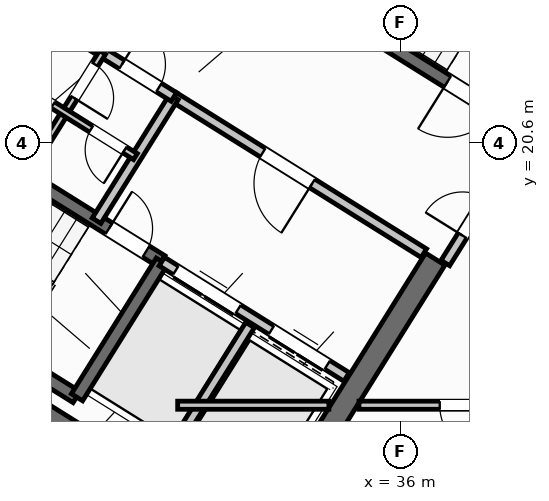
"""IFC4 building model, lengths in metres.
Left out: names, types, materials, properties, quantities, classifications, styles, units other than length and angle.
Written with IfcOpenShell. Run it as: python <this file> out.ifc"""

import sys

from ifc_helpers import new_model, si_unit, direction, frame, frame_2d, origin, place, context, subcontext, project, spatial, rectangle, extrude, source, transform, mapped, element, fill, save


model = new_model("IFC4")
c1 = context("Model", 3, precision=1e-05, world=origin(), true_north=direction((0.0, 1.0)))
c2 = subcontext(c1, "Body", "Model", "MODEL_VIEW")
j1 = project(units=[si_unit("LENGTHUNIT", "METRE"), si_unit("PLANEANGLEUNIT", "RADIAN")], contexts=[c1])
p1 = place(None, origin())
s1 = spatial("IfcSite", under=j1, at=p1, CompositionType="ELEMENT")
p2 = place(p1, origin())
s2 = spatial("IfcBuilding", under=s1, at=p2, CompositionType="ELEMENT")
p3 = place(p2, frame((0.0, 0.0, 295.2)))
s3 = spatial("IfcBuildingStorey", under=s2, at=p3, CompositionType="ELEMENT", Elevation=295.2)
p4 = place(p3, frame((33.324, 12.503, 0.0), z_axis=(0.0, 0.0, 1.0), x_axis=(-0.848043529849, 0.529926571782, 0.0)))
e1 = element("IfcWall", 1, at=p4, inside=s3, PredefinedType="SHEAR", context=c2, shape_type="SweptSolid", body=[
    extrude(rectangle(XDim=13.04, YDim=0.45, at=frame_2d((6.52, 0.0))), origin(), (0.0, 0.0, 1.0), 3.32),
])
p5 = place(p3, frame((36.683, 18.304, 0.0), z_axis=(0.0, 0.0, 1.0), x_axis=(-0.529904039071, -0.848057609704, 0.0)))
e2 = element("IfcWall", 2, at=p5, inside=s3, PredefinedType="SHEAR", context=c2, shape_type="SweptSolid", body=[
    extrude(rectangle(XDim=6.475, YDim=0.45, at=frame_2d((3.238, 0.0))), origin(), (0.0, 0.0, 1.0), 3.32),
])
p6 = place(p3, frame((29.268, 6.429, 0.0), z_axis=(0.0, 0.0, 1.0), x_axis=(-0.848048398186, 0.529918780885, 0.0)))
e3 = element("IfcWall", 3, at=p6, inside=s3, PredefinedType="STANDARD", context=c2, shape_type="SweptSolid", body=[
    extrude(rectangle(XDim=25.188, YDim=0.32, at=frame_2d((12.594, 0.0))), origin(), (0.0, 0.0, 1.0), 3.32),
])
p7 = place(p6, frame((16.362, 0.0, 0.0)))
e4 = element("IfcOpeningElement", 4, at=p7, cuts=e3, PredefinedType="OPENING", context=c2, shape_type="SweptSolid", body=[
    extrude(rectangle(XDim=1.2, YDim=2.15, at=frame_2d((0.6, 1.075))), frame((0.0, 0.17, 0.0), z_axis=(0.0, -1.0, 0.0), x_axis=(1.0, 0.0, 0.0)), (0.0, 0.0, 1.0), 0.34),
])
p8 = place(p6, frame((3.859, 0.0, 0.9)))
e5 = element("IfcOpeningElement", 5, at=p8, cuts=e3, PredefinedType="OPENING", context=c2, shape_type="SweptSolid", body=[
    extrude(rectangle(XDim=1.65, YDim=1.45, at=frame_2d((0.825, 0.725))), frame((0.0, 0.17, 0.0), z_axis=(0.0, -1.0, 0.0), x_axis=(1.0, 0.0, 0.0)), (0.0, 0.0, 1.0), 0.34),
])
p9 = place(p6, frame((10.519, 0.0, 0.9)))
e6 = element("IfcOpeningElement", 6, at=p9, cuts=e3, PredefinedType="OPENING", context=c2, shape_type="SweptSolid", body=[
    extrude(rectangle(XDim=1.65, YDim=1.45, at=frame_2d((0.825, 0.725))), frame((0.0, 0.17, 0.0), z_axis=(0.0, -1.0, 0.0), x_axis=(1.0, 0.0, 0.0)), (0.0, 0.0, 1.0), 0.34),
])
p10 = place(p6, frame((21.156, 0.0, 0.95)))
e7 = element("IfcOpeningElement", 7, at=p10, cuts=e3, PredefinedType="OPENING", context=c2, shape_type="SweptSolid", body=[
    extrude(rectangle(XDim=1.95, YDim=1.35, at=frame_2d((0.975, 0.675))), frame((0.0, 0.17, 0.0), z_axis=(0.0, -1.0, 0.0), x_axis=(1.0, 0.0, 0.0)), (0.0, 0.0, 1.0), 0.34),
])
p11 = place(p3, frame((29.605, 15.581, 0.0), z_axis=(0.0, 0.0, 1.0), x_axis=(-0.848036911448, 0.529937163087, 0.0)))
e8 = element("IfcWall", 8, at=p11, inside=s3, PredefinedType="SHEAR", context=c2, shape_type="SweptSolid", body=[
    extrude(rectangle(XDim=7.46, YDim=0.26, at=frame_2d((3.73, 0.0))), origin(), (0.0, 0.0, 1.0), 3.32),
])
p12 = place(p3, frame((31.28, 18.261, 0.0), z_axis=(0.0, 0.0, 1.0), x_axis=(-0.848051618787, 0.529913626805, 0.0)))
e9 = element("IfcWall", 9, at=p12, inside=s3, PredefinedType="SHEAR", context=c2, shape_type="SweptSolid", body=[
    extrude(rectangle(XDim=7.46, YDim=0.26, at=frame_2d((3.73, 0.0))), origin(), (0.0, 0.0, 1.0), 3.32),
])
p13 = place(p12, frame((0.36, 0.0, 0.0)))
e10 = element("IfcOpeningElement", 10, at=p13, cuts=e9, PredefinedType="OPENING", context=c2, shape_type="SweptSolid", body=[
    extrude(rectangle(XDim=0.86, YDim=2.05, at=frame_2d((0.43, 1.025))), frame((0.0, 0.14, 0.0), z_axis=(0.0, -1.0, 0.0), x_axis=(1.0, 0.0, 0.0)), (0.0, 0.0, 1.0), 0.28),
])
p14 = place(p3, frame((31.288, 18.256, 0.0), z_axis=(0.0, 0.0, 1.0), x_axis=(-0.529943379326, -0.848033026897, 0.0)))
e11 = element("IfcWall", 11, at=p14, inside=s3, PredefinedType="SHEAR", context=c2, shape_type="SweptSolid", body=[
    extrude(rectangle(XDim=3.16, YDim=0.26, at=frame_2d((1.58, 0.0))), origin(), (0.0, 0.0, 1.0), 3.32),
])
p15 = place(p3, frame((38.046, 21.108, 0.0), z_axis=(0.0, 0.0, 1.0), x_axis=(-0.848054434086, 0.529909121291, 0.0)))
e12 = element("IfcWall", 12, at=p15, inside=s3, PredefinedType="SHEAR", context=c2, shape_type="SweptSolid", body=[
    extrude(rectangle(XDim=7.33, YDim=0.26, at=frame_2d((3.665, 0.0))), origin(), (0.0, 0.0, 1.0), 3.32),
])
p16 = place(p15, frame((0.22, 0.0, 0.0)))
e13 = element("IfcOpeningElement", 13, at=p16, cuts=e12, PredefinedType="OPENING", context=c2, shape_type="SweptSolid", body=[
    extrude(rectangle(XDim=1.1, YDim=2.1, at=frame_2d((0.55, 1.05))), frame((0.0, 0.14, 0.0), z_axis=(0.0, -1.0, 0.0), x_axis=(1.0, 0.0, 0.0)), (0.0, 0.0, 1.0), 0.28),
])
p17 = place(p3, frame((34.933, 15.978, 0.0), z_axis=(0.0, 0.0, 1.0), x_axis=(-0.848055739377, 0.529907032327, 0.0)))
e14 = element("IfcWall", 14, at=p17, inside=s3, PredefinedType="STANDARD", context=c2, shape_type="SweptSolid", body=[
    extrude(rectangle(XDim=4.298, YDim=0.2, at=frame_2d((2.149, 0.0))), origin(), (0.0, 0.0, 1.0), 3.31),
])
p18 = place(p17, frame((0.448, 0.0, 0.0)))
e15 = element("IfcOpeningElement", 15, at=p18, cuts=e14, PredefinedType="OPENING", context=c2, shape_type="SweptSolid", body=[
    extrude(rectangle(XDim=1.3, YDim=2.2, at=frame_2d((0.65, 1.1))), frame((0.0, 0.11, 0.0), z_axis=(0.0, -1.0, 0.0), x_axis=(1.0, 0.0, 0.0)), (0.0, 0.0, 1.0), 0.22),
])
p19 = place(p17, frame((2.523, 0.0, 0.0)))
e16 = element("IfcOpeningElement", 16, at=p19, cuts=e14, PredefinedType="OPENING", context=c2, shape_type="SweptSolid", body=[
    extrude(rectangle(XDim=1.45, YDim=2.25, at=frame_2d((0.725, 1.125))), frame((0.0, 0.11, 0.0), z_axis=(0.0, -1.0, 0.0), x_axis=(1.0, 0.0, 0.0)), (0.0, 0.0, 1.0), 0.22),
])
p20 = place(p3, frame((36.459, 18.421, 0.0), z_axis=(0.0, 0.0, 1.0), x_axis=(-0.848059591691, 0.529900867089, 0.0)))
e17 = element("IfcWall", 17, at=p20, inside=s3, PredefinedType="STANDARD", context=c2, shape_type="SweptSolid", body=[
    extrude(rectangle(XDim=5.818, YDim=0.2, at=frame_2d((2.909, 0.0))), origin(), (0.0, 0.0, 1.0), 3.31),
])
p21 = place(p20, frame((2.598, 0.0, 0.0)))
e18 = element("IfcOpeningElement", 18, at=p21, cuts=e17, PredefinedType="OPENING", context=c2, shape_type="SweptSolid", body=[
    extrude(rectangle(XDim=1.15, YDim=2.1, at=frame_2d((0.575, 1.05))), frame((0.0, 0.11, 0.0), z_axis=(0.0, -1.0, 0.0), x_axis=(1.0, 0.0, 0.0)), (0.0, 0.0, 1.0), 0.22),
])
p22 = place(p3, frame((33.029, 17.003, 0.0), z_axis=(0.0, 0.0, 1.0), x_axis=(-0.529916267533, -0.848049968695, 0.0)))
e19 = element("IfcWall", 19, at=p22, inside=s3, PredefinedType="STANDARD", context=c2, shape_type="SweptSolid", body=[
    extrude(rectangle(XDim=2.92, YDim=0.2, at=frame_2d((1.46, 0.0))), origin(), (0.0, 0.0, 1.0), 3.31),
])
p23 = place(p3, frame((31.525, 21.504, 0.0), z_axis=(0.0, 0.0, 1.0), x_axis=(-0.529907497854, -0.848055448493, 0.0)))
e20 = element("IfcWall", 20, at=p23, inside=s3, PredefinedType="STANDARD", context=c2, shape_type="SweptSolid", body=[
    extrude(rectangle(XDim=2.88, YDim=0.2, at=frame_2d((1.44, 0.0))), origin(), (0.0, 0.0, 1.0), 3.31),
])
p24 = place(p3, frame((31.525, 21.504, 0.0), z_axis=(0.0, 0.0, 1.0), x_axis=(-0.848042066329, 0.529928913853, 0.0)))
e21 = element("IfcWall", 21, at=p24, inside=s3, PredefinedType="STANDARD", context=c2, shape_type="SweptSolid", body=[
    extrude(rectangle(XDim=6.268, YDim=0.2, at=frame_2d((3.134, 0.0))), origin(), (0.0, 0.0, 1.0), 3.31),
])
p25 = place(p24, frame((4.4, 0.0, 0.0)))
e22 = element("IfcOpeningElement", 22, at=p25, cuts=e21, PredefinedType="OPENING", context=c2, shape_type="SweptSolid", body=[
    extrude(rectangle(XDim=0.86, YDim=2.05, at=frame_2d((0.43, 1.025))), frame((0.0, 0.11, 0.0), z_axis=(0.0, -1.0, 0.0), x_axis=(1.0, 0.0, 0.0)), (0.0, 0.0, 1.0), 0.22),
])
p26 = place(p24, frame((0.35, 0.0, 0.0)))
e23 = element("IfcOpeningElement", 23, at=p26, cuts=e21, PredefinedType="OPENING", context=c2, shape_type="SweptSolid", body=[
    extrude(rectangle(XDim=0.86, YDim=2.05, at=frame_2d((0.43, 1.025))), frame((0.0, 0.11, 0.0), z_axis=(0.0, -1.0, 0.0), x_axis=(1.0, 0.0, 0.0)), (0.0, 0.0, 1.0), 0.22),
])
p27 = place(p3, frame((30.117, 22.384, 0.0), z_axis=(0.0, 0.0, 1.0), x_axis=(-0.529951914384, -0.848027693204, 0.0)))
e24 = element("IfcWall", 24, at=p27, inside=s3, PredefinedType="PLUMBINGWALL", context=c2, shape_type="SweptSolid", body=[
    extrude(rectangle(XDim=1.4, YDim=0.14, at=frame_2d((0.7, 0.0))), origin(), (0.0, 0.0, 1.0), 3.31),
])
p28 = place(p27, frame((0.28, 0.0, 0.0)))
e25 = element("IfcOpeningElement", 25, at=p28, cuts=e24, PredefinedType="OPENING", context=c2, shape_type="SweptSolid", body=[
    extrude(rectangle(XDim=0.78, YDim=2.05, at=frame_2d((0.39, 1.025))), frame((0.0, 0.08, 0.0), z_axis=(0.0, -1.0, 0.0), x_axis=(1.0, 0.0, 0.0)), (0.0, 0.0, 1.0), 0.16),
])
p29 = place(p3, frame((29.375, 21.196, 0.0), z_axis=(0.0, 0.0, 1.0), x_axis=(-0.529865479138, -0.848081702443, 0.0)))
e26 = element("IfcWall", 26, at=p29, inside=s3, PredefinedType="PLUMBINGWALL", context=c2, shape_type="SweptSolid", body=[
    extrude(rectangle(XDim=1.48, YDim=0.14, at=frame_2d((0.74, 0.0))), origin(), (0.0, 0.0, 1.0), 3.31),
])
p30 = place(p3, frame((30.766, 20.327, 0.0), z_axis=(0.0, 0.0, 1.0), x_axis=(-0.848052663127, 0.529911955482, 0.0)))
e27 = element("IfcWall", 27, at=p30, inside=s3, PredefinedType="PLUMBINGWALL", context=c2, shape_type="SweptSolid", body=[
    extrude(rectangle(XDim=3.28, YDim=0.14, at=frame_2d((1.64, 0.0))), origin(), (0.0, 0.0, 1.0), 3.31),
])
p31 = place(p30, frame((0.25, 0.0, 0.0)))
e28 = element("IfcOpeningElement", 28, at=p31, cuts=e27, PredefinedType="OPENING", context=c2, shape_type="SweptSolid", body=[
    extrude(rectangle(XDim=0.78, YDim=2.05, at=frame_2d((0.39, 1.025))), frame((0.0, 0.08, 0.0), z_axis=(0.0, -1.0, 0.0), x_axis=(1.0, 0.0, 0.0)), (0.0, 0.0, 1.0), 0.16),
])
p32 = place(p30, frame((1.92, 0.0, 0.0)))
e29 = element("IfcOpeningElement", 29, at=p32, cuts=e27, PredefinedType="OPENING", context=c2, shape_type="SweptSolid", body=[
    extrude(rectangle(XDim=0.78, YDim=2.05, at=frame_2d((0.39, 1.025))), frame((0.0, 0.08, 0.0), z_axis=(0.0, -1.0, 0.0), x_axis=(1.0, 0.0, 0.0)), (0.0, 0.0, 1.0), 0.16),
])
p33 = place(p3, frame((32.164, 10.374, 0.0), z_axis=(0.0, 0.0, 1.0), x_axis=(-0.848044107957, 0.529925646633, 0.0)))
e30 = element("IfcWall", 30, at=p33, inside=s3, PredefinedType="PARTITIONING", context=c2, shape_type="SweptSolid", body=[
    extrude(rectangle(XDim=15.57, YDim=0.16, at=frame_2d((7.785, 0.0))), origin(), (0.0, 0.0, 1.0), 3.31),
])
p34 = place(p33, frame((10.83, 0.0, 0.0)))
e31 = element("IfcOpeningElement", 31, at=p34, cuts=e30, PredefinedType="OPENING", context=c2, shape_type="SweptSolid", body=[
    extrude(rectangle(XDim=1.0, YDim=2.1, at=frame_2d((0.5, 1.05))), frame((0.0, 0.09, 0.0), z_axis=(0.0, -1.0, 0.0), x_axis=(1.0, 0.0, 0.0)), (0.0, 0.0, 1.0), 0.18),
])
p35 = place(p3, frame((29.72, 8.859, 0.0), z_axis=(0.0, 0.0, 1.0), x_axis=(-0.848049134363, 0.529917602752, 0.0)))
e32 = element("IfcWall", 32, at=p35, inside=s3, PredefinedType="PLUMBINGWALL", context=c2, shape_type="SweptSolid", body=[
    extrude(rectangle(XDim=14.3, YDim=0.14, at=frame_2d((7.15, 0.0))), origin(), (0.0, 0.0, 1.0), 3.31),
])
p36 = place(p35, frame((9.57, 0.0, 0.0)))
e33 = element("IfcOpeningElement", 33, at=p36, cuts=e32, PredefinedType="OPENING", context=c2, shape_type="SweptSolid", body=[
    extrude(rectangle(XDim=0.92, YDim=2.08, at=frame_2d((0.46, 1.04))), frame((0.0, 0.08, 0.0), z_axis=(0.0, -1.0, 0.0), x_axis=(1.0, 0.0, 0.0)), (0.0, 0.0, 1.0), 0.16),
])
p37 = place(p3, frame((38.451, 20.737, 0.0), z_axis=(0.0, 0.0, 1.0), x_axis=(-0.529924799939, -0.848044637038, 0.0)))
e34 = element("IfcWall", 34, at=p37, inside=s3, PredefinedType="STANDARD", context=c2, shape_type="SweptSolid", body=[
    extrude(rectangle(XDim=2.96, YDim=0.2, at=frame_2d((1.48, 0.0))), origin(), (0.0, 0.0, 1.0), 3.31),
])
p38 = place(p37, frame((1.46, 0.0, 0.0)))
e35 = element("IfcOpeningElement", 35, at=p38, cuts=e34, PredefinedType="OPENING", context=c2, shape_type="SweptSolid", body=[
    extrude(rectangle(XDim=0.86, YDim=2.05, at=frame_2d((0.43, 1.025))), frame((0.0, 0.11, 0.0), z_axis=(0.0, -1.0, 0.0), x_axis=(1.0, 0.0, 0.0)), (0.0, 0.0, 1.0), 0.22),
])
p39 = place(p3, frame((31.6, 15.42, 0.0), z_axis=(0.0, 0.0, 1.0), x_axis=(1.0, 0.0, 0.0)))
e36 = element("IfcWall", 36, at=p39, inside=s3, PredefinedType="PARTITIONING", context=c2, shape_type="SweptSolid", body=[
    extrude(rectangle(XDim=2.984, YDim=0.16, at=frame_2d((1.492, 0.0))), origin(), (0.0, 0.0, 1.0), 3.31),
])
p40 = place(p3, frame((35.178, 15.42, 0.0), z_axis=(0.0, 0.0, 1.0), x_axis=(1.0, 0.0, 0.0)))
e37 = element("IfcWall", 37, at=p40, inside=s3, PredefinedType="PARTITIONING", context=c2, shape_type="SweptSolid", body=[
    extrude(rectangle(XDim=9.021, YDim=0.16, at=frame_2d((4.511, 0.0))), origin(), (0.0, 0.0, 1.0), 3.31),
])
p41 = place(p40, frame((1.594, 0.0, 0.0)))
e38 = element("IfcOpeningElement", 38, at=p41, cuts=e37, PredefinedType="OPENING", context=c2, shape_type="SweptSolid", body=[
    extrude(rectangle(XDim=1.0, YDim=2.1, at=frame_2d((0.5, 1.05))), frame((0.0, 0.09, 0.0), z_axis=(0.0, -1.0, 0.0), x_axis=(1.0, 0.0, 0.0)), (0.0, 0.0, 1.0), 0.18),
])
m1 = source(origin(), c2, "Body", "SweptSolid", [
    extrude(rectangle(XDim=0.86, YDim=2.05, at=frame_2d((0.43, 1.025))), frame((0.0, 0.025, 0.0), z_axis=(0.0, -1.0, 0.0), x_axis=(1.0, 0.0, 0.0)), (0.0, 0.0, 1.0), 0.05),
])
p42 = place(p13, frame((0.86, 0.0, 0.0), z_axis=(0.0, 0.0, 1.0), x_axis=(-1.0, 0.0, 0.0)))
e39 = element("IfcDoor", 39, at=p42, inside=s3, OperationType="SINGLE_SWING_LEFT", PredefinedType="DOOR", context=c2, shape_type="MappedRepresentation", body=[
    mapped(m1, transform((0.0, 0.0, 0.0), scale=1.0)),
])
fill(e10, e39)
m2 = source(origin(), c2, "Body", "SweptSolid", [
    extrude(rectangle(XDim=1.1, YDim=2.1, at=frame_2d((0.55, 1.05))), frame((0.0, 0.025, 0.0), z_axis=(0.0, -1.0, 0.0), x_axis=(1.0, 0.0, 0.0)), (0.0, 0.0, 1.0), 0.05),
])
p43 = place(p16, origin())
e40 = element("IfcDoor", 40, at=p43, inside=s3, OperationType="SINGLE_SWING_RIGHT", PredefinedType="DOOR", context=c2, shape_type="MappedRepresentation", body=[
    mapped(m2, transform((0.0, 0.0, 0.0), scale=1.0)),
])
fill(e13, e40)
m3 = source(origin(), c2, "Body", "SweptSolid", [
    extrude(rectangle(XDim=1.15, YDim=2.1, at=frame_2d((0.575, 1.05))), frame((0.0, 0.025, 0.0), z_axis=(0.0, -1.0, 0.0), x_axis=(1.0, 0.0, 0.0)), (0.0, 0.0, 1.0), 0.05),
])
p44 = place(p21, origin())
e41 = element("IfcDoor", 41, at=p44, inside=s3, OperationType="SINGLE_SWING_LEFT", PredefinedType="DOOR", context=c2, shape_type="MappedRepresentation", body=[
    mapped(m3, transform((0.0, 0.0, 0.0), scale=1.0)),
])
fill(e18, e41)
m4 = source(origin(), c2, "Body", "SweptSolid", [
    extrude(rectangle(XDim=1.3, YDim=2.2, at=frame_2d((0.65, 1.1))), frame((0.0, 0.025, 0.0), z_axis=(0.0, -1.0, 0.0), x_axis=(1.0, 0.0, 0.0)), (0.0, 0.0, 1.0), 0.05),
])
p45 = place(p18, origin())
e42 = element("IfcDoor", 42, at=p45, inside=s3, OperationType="DOUBLE_DOOR_SLIDING", PredefinedType="DOOR", context=c2, shape_type="MappedRepresentation", body=[
    mapped(m4, transform((0.0, 0.0, 0.0), scale=1.0)),
])
fill(e15, e42)
m5 = source(origin(), c2, "Body", "SweptSolid", [
    extrude(rectangle(XDim=1.45, YDim=2.25, at=frame_2d((0.725, 1.125))), frame((0.0, 0.025, 0.0), z_axis=(0.0, -1.0, 0.0), x_axis=(1.0, 0.0, 0.0)), (0.0, 0.0, 1.0), 0.05),
])
p46 = place(p19, origin())
e43 = element("IfcDoor", 43, at=p46, inside=s3, OperationType="DOUBLE_DOOR_SLIDING", PredefinedType="DOOR", context=c2, shape_type="MappedRepresentation", body=[
    mapped(m5, transform((0.0, 0.0, 0.0), scale=1.0)),
])
fill(e16, e43)
p47 = place(p26, frame((0.86, 0.0, 0.0), z_axis=(0.0, 0.0, 1.0), x_axis=(-1.0, 0.0, 0.0)))
e44 = element("IfcDoor", 44, at=p47, inside=s3, OperationType="SINGLE_SWING_LEFT", PredefinedType="DOOR", context=c2, shape_type="MappedRepresentation", body=[
    mapped(m1, transform((0.0, 0.0, 0.0), scale=1.0)),
])
fill(e23, e44)
m6 = source(origin(), c2, "Body", "SweptSolid", [
    extrude(rectangle(XDim=0.78, YDim=2.05, at=frame_2d((0.39, 1.025))), frame((0.0, 0.025, 0.0), z_axis=(0.0, -1.0, 0.0), x_axis=(1.0, 0.0, 0.0)), (0.0, 0.0, 1.0), 0.05),
])
p48 = place(p28, origin())
e45 = element("IfcDoor", 45, at=p48, inside=s3, OperationType="SINGLE_SWING_RIGHT", PredefinedType="DOOR", context=c2, shape_type="MappedRepresentation", body=[
    mapped(m6, transform((0.0, 0.0, 0.0), scale=1.0)),
])
fill(e25, e45)
p49 = place(p31, origin())
e46 = element("IfcDoor", 46, at=p49, inside=s3, OperationType="SINGLE_SWING_LEFT", PredefinedType="DOOR", context=c2, shape_type="MappedRepresentation", body=[
    mapped(m6, transform((0.0, 0.0, 0.0), scale=1.0)),
])
fill(e28, e46)
p50 = place(p32, origin())
e47 = element("IfcDoor", 47, at=p50, inside=s3, OperationType="SINGLE_SWING_RIGHT", PredefinedType="DOOR", context=c2, shape_type="MappedRepresentation", body=[
    mapped(m6, transform((0.0, 0.0, 0.0), scale=1.0)),
])
fill(e29, e47)
p51 = place(p38, frame((0.86, 0.0, 0.0), z_axis=(0.0, 0.0, 1.0), x_axis=(-1.0, 0.0, 0.0)))
e48 = element("IfcDoor", 48, at=p51, inside=s3, OperationType="SINGLE_SWING_LEFT", PredefinedType="DOOR", context=c2, shape_type="MappedRepresentation", body=[
    mapped(m1, transform((0.0, 0.0, 0.0), scale=1.0)),
])
fill(e35, e48)
m7 = source(origin(), c2, "Body", "SweptSolid", [
    extrude(rectangle(XDim=1.0, YDim=2.1, at=frame_2d((0.5, 1.05))), frame((0.0, 0.025, 0.0), z_axis=(0.0, -1.0, 0.0), x_axis=(1.0, 0.0, 0.0)), (0.0, 0.0, 1.0), 0.05),
])
p52 = place(p41, frame((1.0, 0.0, 0.0), z_axis=(0.0, 0.0, 1.0), x_axis=(-1.0, 0.0, 0.0)))
e49 = element("IfcDoor", 49, at=p52, inside=s3, OperationType="SINGLE_SWING_LEFT", PredefinedType="DOOR", context=c2, shape_type="MappedRepresentation", body=[
    mapped(m7, transform((0.0, 0.0, 0.0), scale=1.0)),
])
fill(e38, e49)
save(model, sys.argv[1])
